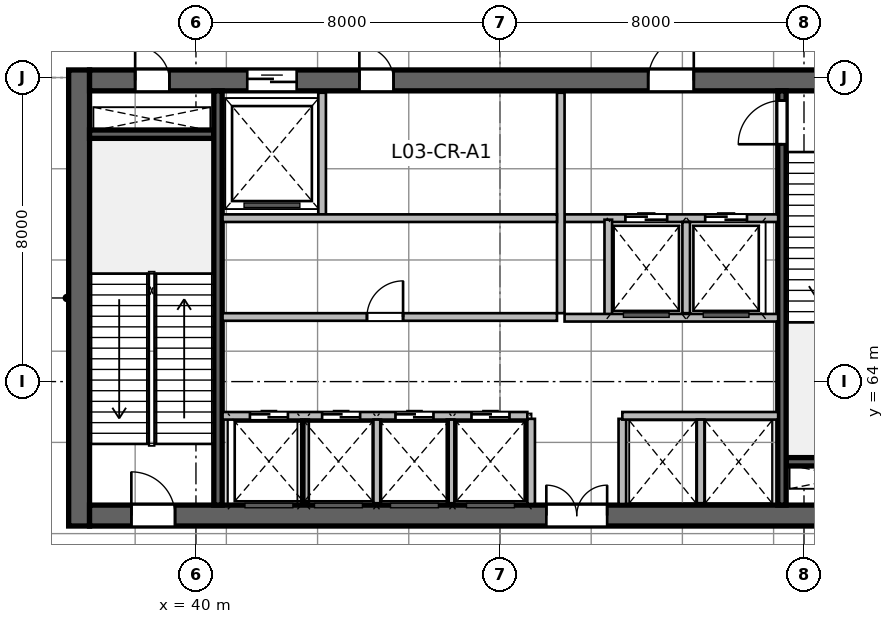
"""IFC4 building model, lengths in metres.
Left out: names, types, materials, properties, quantities, classifications, styles, units other than length and angle.
Written with IfcOpenShell. Run it as: python <this file> out.ifc"""

import sys

from ifc_helpers import new_model, si_unit, direction, frame, frame_2d, origin, place, context, subcontext, project, spatial, rectangle, extrude, source, transform, mapped, element, fill, save


model = new_model("IFC4")
c1 = context("Model", 3, precision=1e-05, world=origin(), true_north=direction((0.0, 1.0)))
c2 = subcontext(c1, "Body", "Model", "MODEL_VIEW")
j1 = project(units=[si_unit("LENGTHUNIT", "METRE"), si_unit("PLANEANGLEUNIT", "RADIAN")], contexts=[c1])
p1 = place(None, origin())
s1 = spatial("IfcSite", under=j1, at=p1, CompositionType="ELEMENT")
p2 = place(p1, origin())
s2 = spatial("IfcBuilding", under=s1, at=p2, CompositionType="ELEMENT")
p3 = place(p2, frame((0.0, 0.0, 18.0)))
s3 = spatial("IfcBuildingStorey", under=s2, at=p3, CompositionType="ELEMENT", Elevation=18.0)
m1 = source(origin(), c2, "Body", "SweptSolid", [
    extrude(rectangle(XDim=12.0, YDim=0.55, at=frame_2d((6.0, 0.0))), origin(), (0.0, 0.0, 1.0), 6.0),
])
p4 = place(p3, frame((36.925, 60.2, 0.0), z_axis=(0.0, 0.0, 1.0), x_axis=(0.0, 1.0, 0.0)))
e1 = element("IfcWall", 1, at=p4, inside=s3, PredefinedType="SHEAR", context=c2, shape_type="MappedRepresentation", body=[
    mapped(m1, transform((0.0, 0.0, 0.0), scale=1.0)),
])
m2 = source(origin(), c2, "Body", "SweptSolid", [
    extrude(rectangle(XDim=21.6, YDim=0.55, at=frame_2d((10.8, 0.0))), origin(), (0.0, 0.0, 1.0), 6.0),
])
p5 = place(p3, frame((37.2, 60.475, 0.0), z_axis=(0.0, 0.0, 1.0), x_axis=(1.0, 0.0, 0.0)))
e2 = element("IfcWall", 2, at=p5, inside=s3, PredefinedType="SHEAR", context=c2, shape_type="MappedRepresentation", body=[
    mapped(m2, transform((0.0, 0.0, 0.0), scale=1.0)),
])
p6 = place(p5, frame((1.1, 0.0, 0.0)))
e3 = element("IfcOpeningElement", 3, at=p6, cuts=e2, PredefinedType="OPENING", context=c2, shape_type="SweptSolid", body=[
    extrude(rectangle(XDim=1.15, YDim=2.15, at=frame_2d((0.575, 1.075))), frame((0.0, 0.285, 0.0), z_axis=(0.0, -1.0, 0.0), x_axis=(1.0, 0.0, 0.0)), (0.0, 0.0, 1.0), 0.57),
])
p7 = place(p5, frame((19.5, 0.0, 0.0)))
e4 = element("IfcOpeningElement", 4, at=p7, cuts=e2, PredefinedType="OPENING", context=c2, shape_type="SweptSolid", body=[
    extrude(rectangle(XDim=0.9, YDim=2.1, at=frame_2d((0.45, 1.05))), frame((0.0, 0.285, 0.0), z_axis=(0.0, -1.0, 0.0), x_axis=(1.0, 0.0, 0.0)), (0.0, 0.0, 1.0), 0.57),
])
p8 = place(p5, frame((12.02, 0.0, 0.0)))
e5 = element("IfcOpeningElement", 5, at=p8, cuts=e2, PredefinedType="OPENING", context=c2, shape_type="SweptSolid", body=[
    extrude(rectangle(XDim=1.6, YDim=2.15, at=frame_2d((0.8, 1.075))), frame((0.0, 0.285, 0.0), z_axis=(0.0, -1.0, 0.0), x_axis=(1.0, 0.0, 0.0)), (0.0, 0.0, 1.0), 0.57),
])
p9 = place(p3, frame((37.2, 71.925, 0.0), z_axis=(0.0, 0.0, 1.0), x_axis=(1.0, 0.0, 0.0)))
e6 = element("IfcWall", 6, at=p9, inside=s3, PredefinedType="SHEAR", context=c2, shape_type="MappedRepresentation", body=[
    mapped(m2, transform((0.0, 0.0, 0.0), scale=1.0)),
])
p10 = place(p9, frame((1.2, 0.0, 0.0)))
e7 = element("IfcOpeningElement", 7, at=p10, cuts=e6, PredefinedType="OPENING", context=c2, shape_type="SweptSolid", body=[
    extrude(rectangle(XDim=0.9, YDim=2.1, at=frame_2d((0.45, 1.05))), frame((0.0, 0.285, 0.0), z_axis=(0.0, -1.0, 0.0), x_axis=(1.0, 0.0, 0.0)), (0.0, 0.0, 1.0), 0.57),
])
p11 = place(p9, frame((14.7, 0.0, 0.0)))
e8 = element("IfcOpeningElement", 8, at=p11, cuts=e6, PredefinedType="OPENING", context=c2, shape_type="SweptSolid", body=[
    extrude(rectangle(XDim=1.2, YDim=2.15, at=frame_2d((0.6, 1.075))), frame((0.0, 0.285, 0.0), z_axis=(0.0, -1.0, 0.0), x_axis=(1.0, 0.0, 0.0)), (0.0, 0.0, 1.0), 0.57),
])
p12 = place(p9, frame((4.15, 0.0, 0.0)))
e9 = element("IfcOpeningElement", 9, at=p12, cuts=e6, PredefinedType="OPENING", context=c2, shape_type="SweptSolid", body=[
    extrude(rectangle(XDim=1.3, YDim=2.15, at=frame_2d((0.65, 1.075))), frame((0.0, 0.285, 0.0), z_axis=(0.0, -1.0, 0.0), x_axis=(1.0, 0.0, 0.0)), (0.0, 0.0, 1.0), 0.57),
])
p13 = place(p9, frame((7.1, 0.0, 0.0)))
e10 = element("IfcOpeningElement", 10, at=p13, cuts=e6, PredefinedType="OPENING", context=c2, shape_type="SweptSolid", body=[
    extrude(rectangle(XDim=0.9, YDim=2.1, at=frame_2d((0.45, 1.05))), frame((0.0, 0.285, 0.0), z_axis=(0.0, -1.0, 0.0), x_axis=(1.0, 0.0, 0.0)), (0.0, 0.0, 1.0), 0.57),
])
m3 = source(origin(), c2, "Body", "SweptSolid", [
    extrude(rectangle(XDim=3.27, YDim=0.22, at=frame_2d((1.635, 0.0))), origin(), (0.0, 0.0, 1.0), 6.0),
])
for number, where, z_axis, x_axis in (
    (11, (37.2, 70.51, 0.0), (0.0, 0.0, 1.0), (1.0, 0.0, 0.0)),
    (12, (55.53, 61.89, 0.0), (0.0, 0.0, 1.0), (1.0, 0.0, 0.0)),
):
    element("IfcWall", number, at=place(p3, frame(where, z_axis=z_axis, x_axis=x_axis)), inside=s3, PredefinedType="SHEAR", context=c2, shape_type="MappedRepresentation", body=[
        mapped(m3, transform((0.0, 0.0, 0.0), scale=1.0)),
    ])
m4 = source(origin(), c2, "Body", "SweptSolid", [
    extrude(rectangle(XDim=10.9, YDim=0.22, at=frame_2d((5.45, 0.0))), origin(), (0.0, 0.0, 1.0), 6.0),
])
p14 = place(p3, frame((40.58, 60.75, 0.0), z_axis=(0.0, 0.0, 1.0), x_axis=(0.0, 1.0, 0.0)))
e13 = element("IfcWall", 13, at=p14, inside=s3, PredefinedType="SHEAR", context=c2, shape_type="MappedRepresentation", body=[
    mapped(m4, transform((0.0, 0.0, 0.0), scale=1.0)),
])
p15 = place(p3, frame((55.42, 60.75, 0.0), z_axis=(0.0, 0.0, 1.0), x_axis=(0.0, 1.0, 0.0)))
e14 = element("IfcWall", 14, at=p15, inside=s3, PredefinedType="SHEAR", context=c2, shape_type="MappedRepresentation", body=[
    mapped(m4, transform((0.0, 0.0, 0.0), scale=1.0)),
])
p16 = place(p15, frame((9.495, 0.0, 0.0)))
e15 = element("IfcOpeningElement", 15, at=p16, cuts=e14, PredefinedType="OPENING", context=c2, shape_type="SweptSolid", body=[
    extrude(rectangle(XDim=1.15, YDim=2.15, at=frame_2d((0.575, 1.075))), frame((0.0, 0.12, 0.0), z_axis=(0.0, -1.0, 0.0), x_axis=(1.0, 0.0, 0.0)), (0.0, 0.0, 1.0), 0.24),
])
m5 = source(origin(), c2, "Body", "SweptSolid", [
    extrude(rectangle(XDim=2.24, YDim=0.2, at=frame_2d((1.12, 0.0))), origin(), (0.0, 0.0, 1.0), 5.62),
])
for number, where, z_axis, x_axis in (
    (16, (48.82, 60.78, 0.0), (0.0, 0.0, 1.0), (0.0, 1.0, 0.0)),
    (17, (51.22, 60.78, 0.0), (0.0, 0.0, 1.0), (0.0, 1.0, 0.0)),
):
    element("IfcWall", number, at=place(p3, frame(where, z_axis=z_axis, x_axis=x_axis)), inside=s3, PredefinedType="SOLIDWALL", context=c2, shape_type="MappedRepresentation", body=[
        mapped(m5, transform((0.0, 0.0, 0.0), scale=1.0)),
    ])
m6 = source(origin(), c2, "Body", "SweptSolid", [
    extrude(rectangle(XDim=5.62, YDim=0.2, at=frame_2d((2.81, 0.0))), origin(), (0.0, 0.0, 1.0), 5.62),
])
p17 = place(p3, frame((49.7, 68.3, 0.0), z_axis=(0.0, 0.0, 1.0), x_axis=(1.0, 0.0, 0.0)))
e18 = element("IfcWall", 18, at=p17, inside=s3, PredefinedType="SOLIDWALL", context=c2, shape_type="MappedRepresentation", body=[
    mapped(m6, transform((0.0, 0.0, 0.0), scale=1.0)),
])
p18 = place(p17, frame((1.6, 0.0, 0.0)))
e19 = element("IfcOpeningElement", 19, at=p18, cuts=e18, PredefinedType="OPENING", context=c2, shape_type="SweptSolid", body=[
    extrude(rectangle(XDim=1.1, YDim=2.15, at=frame_2d((0.55, 1.075))), frame((0.0, 0.11, 0.0), z_axis=(0.0, -1.0, 0.0), x_axis=(1.0, 0.0, 0.0)), (0.0, 0.0, 1.0), 0.22),
])
p19 = place(p17, frame((3.7, 0.0, 0.0)))
e20 = element("IfcOpeningElement", 20, at=p19, cuts=e18, PredefinedType="OPENING", context=c2, shape_type="SweptSolid", body=[
    extrude(rectangle(XDim=1.1, YDim=2.15, at=frame_2d((0.55, 1.075))), frame((0.0, 0.11, 0.0), z_axis=(0.0, -1.0, 0.0), x_axis=(1.0, 0.0, 0.0)), (0.0, 0.0, 1.0), 0.22),
])
m7 = source(origin(), c2, "Body", "SweptSolid", [
    extrude(rectangle(XDim=5.8, YDim=0.2, at=frame_2d((2.9, 0.0))), origin(), (0.0, 0.0, 1.0), 5.62),
])
p20 = place(p3, frame((49.6, 65.8, 0.0), z_axis=(0.0, 0.0, 1.0), x_axis=(0.0, 1.0, 0.0)))
e21 = element("IfcWall", 21, at=p20, inside=s3, PredefinedType="SOLIDWALL", context=c2, shape_type="MappedRepresentation", body=[
    mapped(m7, transform((0.0, 0.0, 0.0), scale=1.0)),
])
m8 = source(origin(), c2, "Body", "SweptSolid", [
    extrude(rectangle(XDim=2.58, YDim=0.2, at=frame_2d((1.29, 0.0))), origin(), (0.0, 0.0, 1.0), 5.62),
])
p21 = place(p3, frame((50.85, 65.68, 0.0), z_axis=(0.0, 0.0, 1.0), x_axis=(0.0, 1.0, 0.0)))
e22 = element("IfcWall", 22, at=p21, inside=s3, PredefinedType="SOLIDWALL", context=c2, shape_type="MappedRepresentation", body=[
    mapped(m8, transform((0.0, 0.0, 0.0), scale=1.0)),
])
m9 = source(origin(), c2, "Body", "SweptSolid", [
    extrude(rectangle(XDim=2.4, YDim=0.2, at=frame_2d((1.2, 0.0))), origin(), (0.0, 0.0, 1.0), 5.62),
])
p22 = place(p3, frame((52.9, 65.8, 0.0), z_axis=(0.0, 0.0, 1.0), x_axis=(0.0, 1.0, 0.0)))
e23 = element("IfcWall", 23, at=p22, inside=s3, PredefinedType="SOLIDWALL", context=c2, shape_type="MappedRepresentation", body=[
    mapped(m9, transform((0.0, 0.0, 0.0), scale=1.0)),
])
p23 = place(p3, frame((49.7, 65.68, 0.0), z_axis=(0.0, 0.0, 1.0), x_axis=(1.0, 0.0, 0.0)))
e24 = element("IfcWall", 24, at=p23, inside=s3, PredefinedType="SOLIDWALL", context=c2, shape_type="MappedRepresentation", body=[
    mapped(m6, transform((0.0, 0.0, 0.0), scale=1.0)),
])
m10 = source(origin(), c2, "Body", "SweptSolid", [
    extrude(rectangle(XDim=3.2, YDim=0.2, at=frame_2d((1.6, 0.0))), origin(), (0.0, 0.0, 1.0), 5.62),
])
p24 = place(p3, frame((43.32, 68.4, 0.0), z_axis=(0.0, 0.0, 1.0), x_axis=(0.0, 1.0, 0.0)))
e25 = element("IfcWall", 25, at=p24, inside=s3, PredefinedType="SOLIDWALL", context=c2, shape_type="MappedRepresentation", body=[
    mapped(m10, transform((0.0, 0.0, 0.0), scale=1.0)),
])
m11 = source(origin(), c2, "Body", "SweptSolid", [
    extrude(rectangle(XDim=8.8, YDim=0.2, at=frame_2d((4.4, 0.0))), origin(), (0.0, 0.0, 1.0), 5.62),
])
p25 = place(p3, frame((40.7, 68.3, 0.0), z_axis=(0.0, 0.0, 1.0), x_axis=(1.0, 0.0, 0.0)))
e26 = element("IfcWall", 26, at=p25, inside=s3, PredefinedType="SOLIDWALL", context=c2, shape_type="MappedRepresentation", body=[
    mapped(m11, transform((0.0, 0.0, 0.0), scale=1.0)),
])
m12 = source(origin(), c2, "Body", "SweptSolid", [
    extrude(rectangle(XDim=8.02, YDim=0.2, at=frame_2d((4.01, 0.0))), origin(), (0.0, 0.0, 1.0), 5.62),
])
p26 = place(p3, frame((40.7, 63.1, 0.0), z_axis=(0.0, 0.0, 1.0), x_axis=(1.0, 0.0, 0.0)))
e27 = element("IfcWall", 27, at=p26, inside=s3, PredefinedType="SOLIDWALL", context=c2, shape_type="MappedRepresentation", body=[
    mapped(m12, transform((0.0, 0.0, 0.0), scale=1.0)),
])
p27 = place(p26, frame((0.72, 0.0, 0.0)))
e28 = element("IfcOpeningElement", 28, at=p27, cuts=e27, PredefinedType="OPENING", context=c2, shape_type="SweptSolid", body=[
    extrude(rectangle(XDim=1.0, YDim=2.15, at=frame_2d((0.5, 1.075))), frame((0.0, 0.11, 0.0), z_axis=(0.0, -1.0, 0.0), x_axis=(1.0, 0.0, 0.0)), (0.0, 0.0, 1.0), 0.22),
])
p28 = place(p26, frame((2.62, 0.0, 0.0)))
e29 = element("IfcOpeningElement", 29, at=p28, cuts=e27, PredefinedType="OPENING", context=c2, shape_type="SweptSolid", body=[
    extrude(rectangle(XDim=1.0, YDim=2.15, at=frame_2d((0.5, 1.075))), frame((0.0, 0.11, 0.0), z_axis=(0.0, -1.0, 0.0), x_axis=(1.0, 0.0, 0.0)), (0.0, 0.0, 1.0), 0.22),
])
p29 = place(p26, frame((4.55, 0.0, 0.0)))
e30 = element("IfcOpeningElement", 30, at=p29, cuts=e27, PredefinedType="OPENING", context=c2, shape_type="SweptSolid", body=[
    extrude(rectangle(XDim=1.0, YDim=2.15, at=frame_2d((0.5, 1.075))), frame((0.0, 0.11, 0.0), z_axis=(0.0, -1.0, 0.0), x_axis=(1.0, 0.0, 0.0)), (0.0, 0.0, 1.0), 0.22),
])
p30 = place(p26, frame((6.55, 0.0, 0.0)))
e31 = element("IfcOpeningElement", 31, at=p30, cuts=e27, PredefinedType="OPENING", context=c2, shape_type="SweptSolid", body=[
    extrude(rectangle(XDim=1.0, YDim=2.15, at=frame_2d((0.5, 1.075))), frame((0.0, 0.11, 0.0), z_axis=(0.0, -1.0, 0.0), x_axis=(1.0, 0.0, 0.0)), (0.0, 0.0, 1.0), 0.22),
])
m13 = source(origin(), c2, "Body", "SweptSolid", [
    extrude(rectangle(XDim=4.1, YDim=0.2, at=frame_2d((2.05, 0.0))), origin(), (0.0, 0.0, 1.0), 5.62),
])
p31 = place(p3, frame((51.22, 63.1, 0.0), z_axis=(0.0, 0.0, 1.0), x_axis=(1.0, 0.0, 0.0)))
e32 = element("IfcWall", 32, at=p31, inside=s3, PredefinedType="SOLIDWALL", context=c2, shape_type="MappedRepresentation", body=[
    mapped(m13, transform((0.0, 0.0, 0.0), scale=1.0)),
])
m14 = source(origin(), c2, "Body", "SweptSolid", [
    extrude(rectangle(XDim=2.2, YDim=0.2, at=frame_2d((1.1, 0.0))), origin(), (0.0, 0.0, 1.0), 5.62),
])
for number, where, z_axis, x_axis in (
    (33, (42.87, 60.8, 0.0), (0.0, 0.0, 1.0), (0.0, 1.0, 0.0)),
    (34, (44.77, 60.8, 0.0), (0.0, 0.0, 1.0), (0.0, 1.0, 0.0)),
    (35, (46.7, 60.8, 0.0), (0.0, 0.0, 1.0), (0.0, 1.0, 0.0)),
    (36, (53.28, 60.8, 0.0), (0.0, 0.0, 1.0), (0.0, 1.0, 0.0)),
):
    element("IfcWall", number, at=place(p3, frame(where, z_axis=z_axis, x_axis=x_axis)), inside=s3, PredefinedType="SOLIDWALL", context=c2, shape_type="MappedRepresentation", body=[
        mapped(m14, transform((0.0, 0.0, 0.0), scale=1.0)),
    ])
p32 = place(p3, frame((40.7, 65.7, 0.0), z_axis=(0.0, 0.0, 1.0), x_axis=(1.0, 0.0, 0.0)))
e37 = element("IfcWall", 37, at=p32, inside=s3, PredefinedType="SOLIDWALL", context=c2, shape_type="MappedRepresentation", body=[
    mapped(m11, transform((0.0, 0.0, 0.0), scale=1.0)),
])
p33 = place(p32, frame((3.8, 0.0, 0.0)))
e38 = element("IfcOpeningElement", 38, at=p33, cuts=e37, PredefinedType="OPENING", context=c2, shape_type="SweptSolid", body=[
    extrude(rectangle(XDim=0.95, YDim=2.15, at=frame_2d((0.475, 1.075))), frame((0.0, 0.11, 0.0), z_axis=(0.0, -1.0, 0.0), x_axis=(1.0, 0.0, 0.0)), (0.0, 0.0, 1.0), 0.22),
])
m15 = source(origin(), c2, "Body", "SweptSolid", [
    extrude(rectangle(XDim=1.15, YDim=2.15, at=frame_2d((0.575, 1.075))), frame((0.0, 0.025, 0.0), z_axis=(0.0, -1.0, 0.0), x_axis=(1.0, 0.0, 0.0)), (0.0, 0.0, 1.0), 0.05),
])
p34 = place(p6, origin())
e39 = element("IfcDoor", 39, at=p34, inside=s3, OperationType="SINGLE_SWING_LEFT", PredefinedType="DOOR", context=c2, shape_type="MappedRepresentation", body=[
    mapped(m15, transform((0.0, 0.0, 0.0), scale=1.0)),
])
fill(e3, e39)
m16 = source(origin(), c2, "Body", "SweptSolid", [
    extrude(rectangle(XDim=0.9, YDim=2.1, at=frame_2d((0.45, 1.05))), frame((0.0, 0.025, 0.0), z_axis=(0.0, -1.0, 0.0), x_axis=(1.0, 0.0, 0.0)), (0.0, 0.0, 1.0), 0.05),
])
p35 = place(p10, origin())
e40 = element("IfcDoor", 40, at=p35, inside=s3, OperationType="SINGLE_SWING_LEFT", PredefinedType="DOOR", context=c2, shape_type="MappedRepresentation", body=[
    mapped(m16, transform((0.0, 0.0, 0.0), scale=1.0)),
])
fill(e7, e40)
p36 = place(p16, origin())
e41 = element("IfcDoor", 41, at=p36, inside=s3, OperationType="SINGLE_SWING_LEFT", PredefinedType="DOOR", context=c2, shape_type="MappedRepresentation", body=[
    mapped(m15, transform((0.0, 0.0, 0.0), scale=1.0)),
])
fill(e15, e41)
m17 = source(origin(), c2, "Body", "SweptSolid", [
    extrude(rectangle(XDim=1.6, YDim=2.15, at=frame_2d((0.8, 1.075))), frame((0.0, 0.025, 0.0), z_axis=(0.0, -1.0, 0.0), x_axis=(1.0, 0.0, 0.0)), (0.0, 0.0, 1.0), 0.05),
])
p37 = place(p8, origin())
e42 = element("IfcDoor", 42, at=p37, inside=s3, OperationType="DOUBLE_DOOR_SINGLE_SWING", PredefinedType="DOOR", context=c2, shape_type="MappedRepresentation", body=[
    mapped(m17, transform((0.0, 0.0, 0.0), scale=1.0)),
])
fill(e5, e42)
m18 = source(origin(), c2, "Body", "SweptSolid", [
    extrude(rectangle(XDim=1.2, YDim=2.15, at=frame_2d((0.6, 1.075))), frame((0.0, 0.025, 0.0), z_axis=(0.0, -1.0, 0.0), x_axis=(1.0, 0.0, 0.0)), (0.0, 0.0, 1.0), 0.05),
])
p38 = place(p11, origin())
e43 = element("IfcDoor", 43, at=p38, inside=s3, OperationType="SINGLE_SWING_RIGHT", PredefinedType="DOOR", context=c2, shape_type="MappedRepresentation", body=[
    mapped(m18, transform((0.0, 0.0, 0.0), scale=1.0)),
])
fill(e8, e43)
m19 = source(origin(), c2, "Body", "SweptSolid", [
    extrude(rectangle(XDim=1.1, YDim=2.15, at=frame_2d((0.55, 1.075))), frame((0.0, 0.025, 0.0), z_axis=(0.0, -1.0, 0.0), x_axis=(1.0, 0.0, 0.0)), (0.0, 0.0, 1.0), 0.05),
])
p39 = place(p18, origin())
e44 = element("IfcDoor", 44, at=p39, inside=s3, OperationType="DOUBLE_DOOR_SLIDING", PredefinedType="DOOR", context=c2, shape_type="MappedRepresentation", body=[
    mapped(m19, transform((0.0, 0.0, 0.0), scale=1.0)),
])
fill(e19, e44)
p40 = place(p19, origin())
e45 = element("IfcDoor", 45, at=p40, inside=s3, OperationType="DOUBLE_DOOR_SLIDING", PredefinedType="DOOR", context=c2, shape_type="MappedRepresentation", body=[
    mapped(m19, transform((0.0, 0.0, 0.0), scale=1.0)),
])
fill(e20, e45)
m20 = source(origin(), c2, "Body", "SweptSolid", [
    extrude(rectangle(XDim=1.3, YDim=2.15, at=frame_2d((0.65, 1.075))), frame((0.0, 0.025, 0.0), z_axis=(0.0, -1.0, 0.0), x_axis=(1.0, 0.0, 0.0)), (0.0, 0.0, 1.0), 0.05),
])
p41 = place(p12, origin())
e46 = element("IfcDoor", 46, at=p41, inside=s3, OperationType="DOUBLE_DOOR_SLIDING", PredefinedType="DOOR", context=c2, shape_type="MappedRepresentation", body=[
    mapped(m20, transform((0.0, 0.0, 0.0), scale=1.0)),
])
fill(e9, e46)
p42 = place(p13, origin())
e47 = element("IfcDoor", 47, at=p42, inside=s3, OperationType="SINGLE_SWING_LEFT", PredefinedType="DOOR", context=c2, shape_type="MappedRepresentation", body=[
    mapped(m16, transform((0.0, 0.0, 0.0), scale=1.0)),
])
fill(e10, e47)
m21 = source(origin(), c2, "Body", "SweptSolid", [
    extrude(rectangle(XDim=1.0, YDim=2.15, at=frame_2d((0.5, 1.075))), frame((0.0, 0.025, 0.0), z_axis=(0.0, -1.0, 0.0), x_axis=(1.0, 0.0, 0.0)), (0.0, 0.0, 1.0), 0.05),
])
p43 = place(p27, origin())
e48 = element("IfcDoor", 48, at=p43, inside=s3, OperationType="DOUBLE_DOOR_SLIDING", PredefinedType="DOOR", context=c2, shape_type="MappedRepresentation", body=[
    mapped(m21, transform((0.0, 0.0, 0.0), scale=1.0)),
])
fill(e28, e48)
p44 = place(p28, origin())
e49 = element("IfcDoor", 49, at=p44, inside=s3, OperationType="DOUBLE_DOOR_SLIDING", PredefinedType="DOOR", context=c2, shape_type="MappedRepresentation", body=[
    mapped(m21, transform((0.0, 0.0, 0.0), scale=1.0)),
])
fill(e29, e49)
p45 = place(p29, origin())
e50 = element("IfcDoor", 50, at=p45, inside=s3, OperationType="DOUBLE_DOOR_SLIDING", PredefinedType="DOOR", context=c2, shape_type="MappedRepresentation", body=[
    mapped(m21, transform((0.0, 0.0, 0.0), scale=1.0)),
])
fill(e30, e50)
p46 = place(p30, origin())
e51 = element("IfcDoor", 51, at=p46, inside=s3, OperationType="DOUBLE_DOOR_SLIDING", PredefinedType="DOOR", context=c2, shape_type="MappedRepresentation", body=[
    mapped(m21, transform((0.0, 0.0, 0.0), scale=1.0)),
])
fill(e31, e51)
m22 = source(origin(), c2, "Body", "SweptSolid", [
    extrude(rectangle(XDim=0.95, YDim=2.15, at=frame_2d((0.475, 1.075))), frame((0.0, 0.025, 0.0), z_axis=(0.0, -1.0, 0.0), x_axis=(1.0, 0.0, 0.0)), (0.0, 0.0, 1.0), 0.05),
])
p47 = place(p33, origin())
e52 = element("IfcDoor", 52, at=p47, inside=s3, OperationType="SINGLE_SWING_RIGHT", PredefinedType="DOOR", context=c2, shape_type="MappedRepresentation", body=[
    mapped(m22, transform((0.0, 0.0, 0.0), scale=1.0)),
])
fill(e38, e52)
save(model, sys.argv[1])
